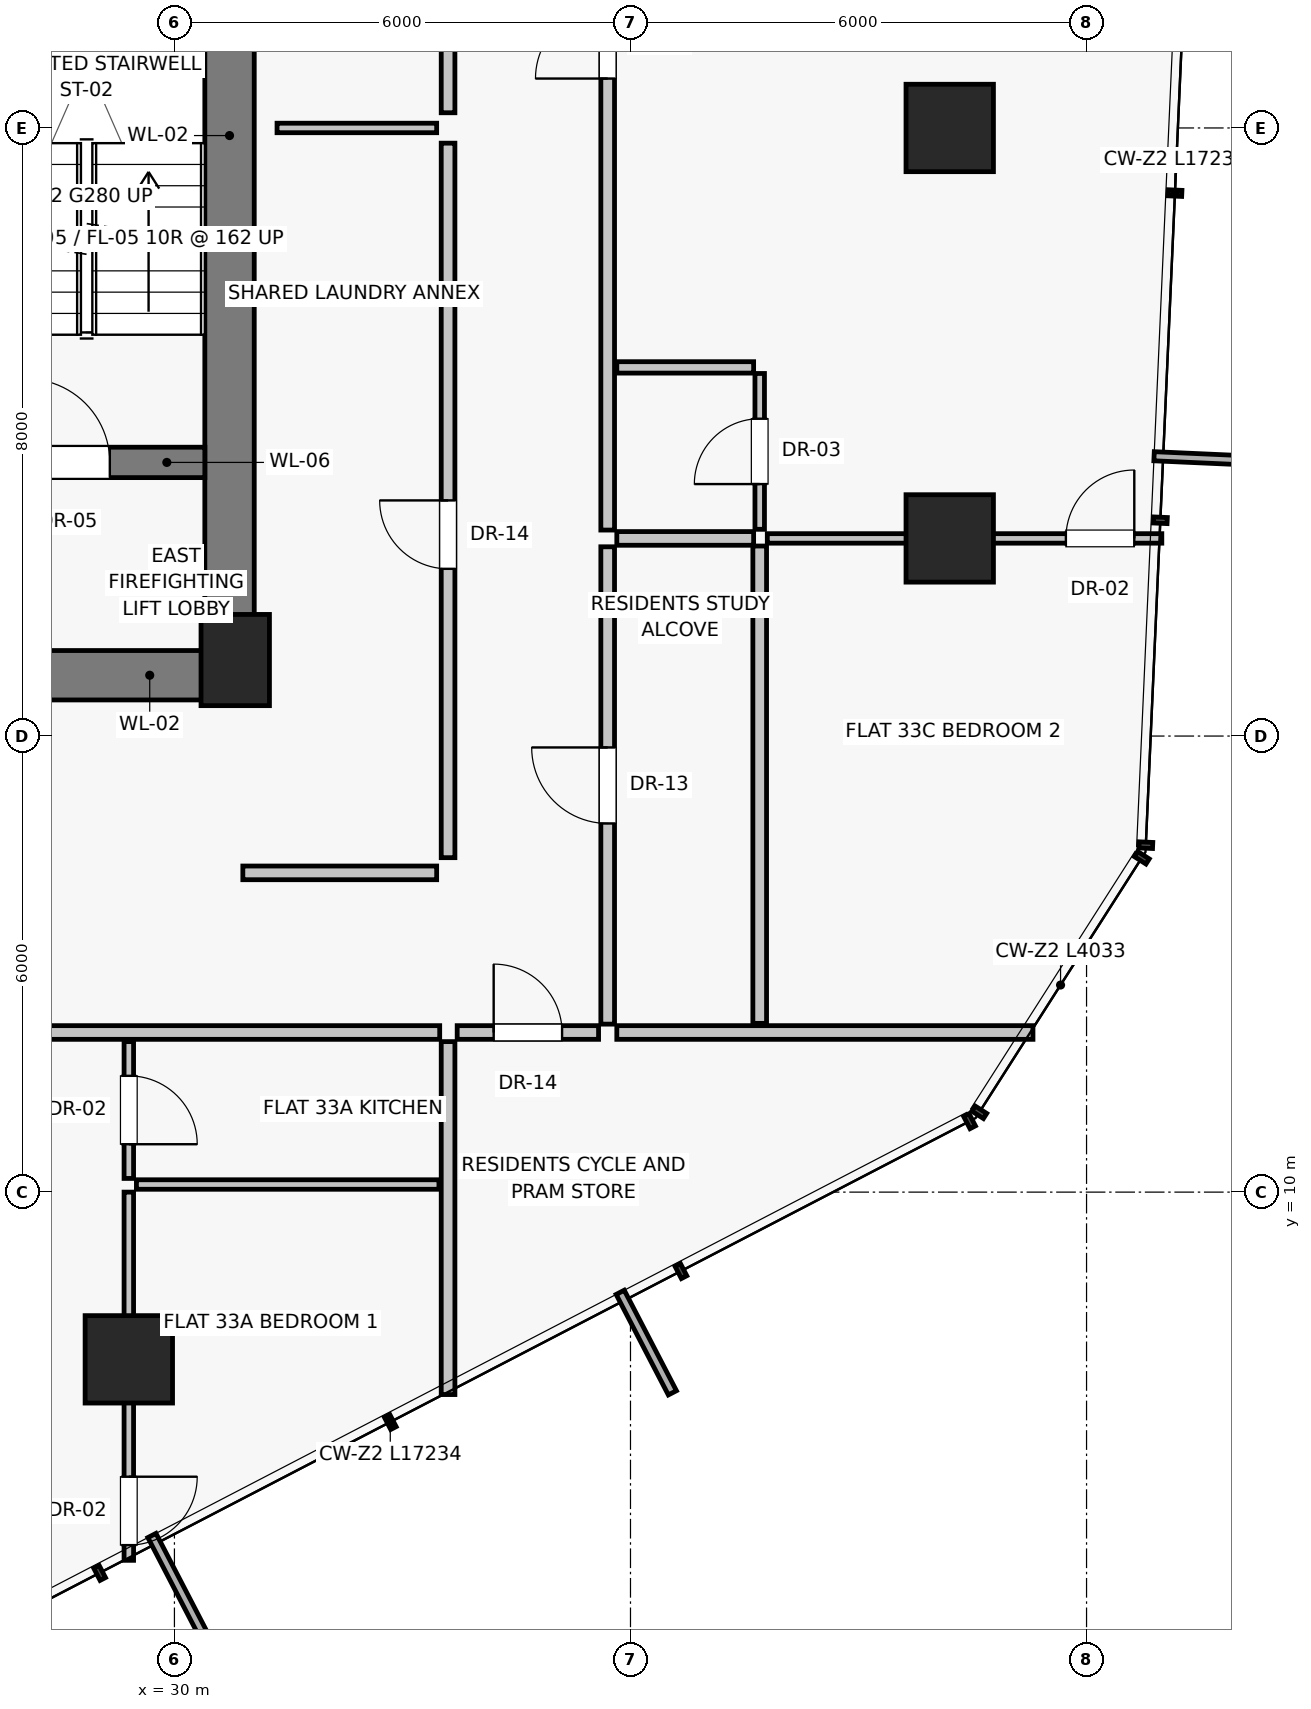
"""IFC4 building model, lengths in metres.
Left out: names, types, materials, properties, quantities, classifications, styles, units other than length and angle.
Written with IfcOpenShell. Run it as: python <this file> out.ifc"""

import sys

from ifc_helpers import new_model, si_unit, direction, frame, frame_2d, origin, origin_2d, place, context, subcontext, project, spatial, rectangle, extrude, source, transform, mapped, element, fill, save


model = new_model("IFC4")
c1 = context("Model", 3, precision=1e-05, world=origin(), true_north=direction((0.0, 1.0)))
c2 = subcontext(c1, "Body", "Model", "MODEL_VIEW")
j1 = project(units=[si_unit("LENGTHUNIT", "METRE"), si_unit("PLANEANGLEUNIT", "RADIAN")], contexts=[c1])
p1 = place(None, origin())
s1 = spatial("IfcSite", under=j1, at=p1, CompositionType="ELEMENT")
p2 = place(p1, origin())
s2 = spatial("IfcBuilding", under=s1, at=p2, CompositionType="ELEMENT")
p3 = place(p2, frame((0.0, 0.0, 119.75)))
s3 = spatial("IfcBuildingStorey", under=s2, at=p3, CompositionType="ELEMENT", Elevation=119.75)
p4 = place(p3, frame((30.8, 17.0, 0.0), z_axis=(0.0, 0.0, 1.0), x_axis=(1.0, 0.0, 0.0)))
e1 = element("IfcColumn", 1, at=p4, inside=s3, PredefinedType="PILASTER", context=c2, shape_type="SweptSolid", body=[
    extrude(rectangle(XDim=0.9, YDim=1.2, at=origin_2d()), origin(), (0.0, 0.0, 1.0), 3.25),
])
for number, where, z_axis, x_axis in (
    (2, (40.2, 18.6, 0.0), (0.0, 0.0, 1.0), (1.0, 0.0, 0.0)),
    (3, (40.2, 24.0, 0.0), (0.0, 0.0, 1.0), (1.0, 0.0, 0.0)),
    (4, (29.4, 7.8, 0.0), (0.0, 0.0, 1.0), (1.0, 0.0, 0.0)),
):
    element("IfcColumn", number, at=place(p3, frame(where, z_axis=z_axis, x_axis=x_axis)), inside=s3, PredefinedType="COLUMN", context=c2, shape_type="SweptSolid", body=[
        extrude(rectangle(XDim=1.15, YDim=1.15, at=origin_2d()), origin(), (0.0, 0.0, 1.0), 3.25),
    ])
p5 = place(p3, frame((30.725, 16.8, 0.0), z_axis=(0.0, 0.0, 1.0), x_axis=(0.0, 1.0, 0.0)))
e5 = element("IfcWall", 5, at=p5, inside=s3, PredefinedType="SHEAR", context=c2, shape_type="SweptSolid", body=[
    extrude(rectangle(XDim=14.2, YDim=0.65, at=frame_2d((7.1, 0.0))), origin(), (0.0, 0.0, 1.0), 3.0),
])
p6 = place(p3, frame((24.95, 16.8, 0.0), z_axis=(0.0, 0.0, 1.0), x_axis=(1.0, 0.0, 0.0)))
e6 = element("IfcWall", 6, at=p6, inside=s3, PredefinedType="SHEAR", context=c2, shape_type="SweptSolid", body=[
    extrude(rectangle(XDim=5.85, YDim=0.65, at=frame_2d((2.925, 0.0))), origin(), (0.0, 0.0, 1.0), 3.0),
])
p7 = place(p6, frame((2.15, 0.0, 0.0)))
e7 = element("IfcOpeningElement", 7, at=p7, cuts=e6, PredefinedType="OPENING", context=c2, shape_type="SweptSolid", body=[
    extrude(rectangle(XDim=1.2, YDim=2.03, at=frame_2d((0.6, 1.015))), frame((0.0, 0.335, 0.0), z_axis=(0.0, -1.0, 0.0), x_axis=(1.0, 0.0, 0.0)), (0.0, 0.0, 1.0), 0.67),
])
p8 = place(p3, frame((27.0, 19.6, 0.0), z_axis=(0.0, 0.0, 1.0), x_axis=(1.0, 0.0, 0.0)))
e8 = element("IfcWall", 8, at=p8, inside=s3, PredefinedType="SHEAR", context=c2, shape_type="SweptSolid", body=[
    extrude(rectangle(XDim=3.4, YDim=0.4, at=frame_2d((1.7, 0.0))), origin(), (0.0, 0.0, 1.0), 3.0),
])
p9 = place(p8, frame((1.05, 0.0, 0.0)))
e9 = element("IfcOpeningElement", 9, at=p9, cuts=e8, PredefinedType="OPENING", context=c2, shape_type="SweptSolid", body=[
    extrude(rectangle(XDim=1.1, YDim=2.03, at=frame_2d((0.55, 1.015))), frame((0.0, 0.21, 0.0), z_axis=(0.0, -1.0, 0.0), x_axis=(1.0, 0.0, 0.0)), (0.0, 0.0, 1.0), 0.42),
])
p10 = place(p3, frame((33.6, 14.4, 0.0), z_axis=(0.0, 0.0, 1.0), x_axis=(0.0, 1.0, 0.0)))
e10 = element("IfcWall", 10, at=p10, inside=s3, PredefinedType="PARTITIONING", context=c2, shape_type="SweptSolid", body=[
    extrude(rectangle(XDim=9.4, YDim=0.18, at=frame_2d((4.7, 0.0))), origin(), (0.0, 0.0, 1.0), 3.0),
])
p11 = place(p10, frame((3.8, 0.0, 0.0)))
e11 = element("IfcOpeningElement", 11, at=p11, cuts=e10, PredefinedType="OPENING", context=c2, shape_type="SweptSolid", body=[
    extrude(rectangle(XDim=0.9, YDim=2.01, at=frame_2d((0.45, 1.005))), frame((0.0, 0.1, 0.0), z_axis=(0.0, -1.0, 0.0), x_axis=(1.0, 0.0, 0.0)), (0.0, 0.0, 1.0), 0.2),
])
p12 = place(p3, frame((33.6, 24.2, 0.0), z_axis=(0.0, 0.0, 1.0), x_axis=(0.0, 1.0, 0.0)))
e12 = element("IfcWall", 12, at=p12, inside=s3, PredefinedType="PARTITIONING", context=c2, shape_type="SweptSolid", body=[
    extrude(rectangle(XDim=9.2, YDim=0.18, at=frame_2d((4.6, 0.0))), origin(), (0.0, 0.0, 1.0), 3.0),
])
p13 = place(p12, frame((3.8, 0.0, 0.0)))
e13 = element("IfcOpeningElement", 13, at=p13, cuts=e12, PredefinedType="OPENING", context=c2, shape_type="SweptSolid", body=[
    extrude(rectangle(XDim=0.9, YDim=2.01, at=frame_2d((0.45, 1.005))), frame((0.0, 0.1, 0.0), z_axis=(0.0, -1.0, 0.0), x_axis=(1.0, 0.0, 0.0)), (0.0, 0.0, 1.0), 0.2),
])
p14 = place(p3, frame((31.35, 24.0, 0.0), z_axis=(0.0, 0.0, 1.0), x_axis=(1.0, 0.0, 0.0)))
e14 = element("IfcWall", 14, at=p14, inside=s3, PredefinedType="PARTITIONING", context=c2, shape_type="SweptSolid", body=[
    extrude(rectangle(XDim=2.1, YDim=0.125, at=frame_2d((1.05, 0.0))), origin(), (0.0, 0.0, 1.0), 3.0),
])
p15 = place(p3, frame((30.9, 14.2, 0.0), z_axis=(0.0, 0.0, 1.0), x_axis=(1.0, 0.0, 0.0)))
e15 = element("IfcWall", 15, at=p15, inside=s3, PredefinedType="PARTITIONING", context=c2, shape_type="SweptSolid", body=[
    extrude(rectangle(XDim=2.55, YDim=0.18, at=frame_2d((1.275, 0.0))), origin(), (0.0, 0.0, 1.0), 3.0),
])
p16 = place(p3, frame((33.6, 11.98, 0.0), z_axis=(0.0, 0.0, 1.0), x_axis=(0.0, -1.0, 0.0)))
e16 = element("IfcWall", 16, at=p16, inside=s3, PredefinedType="PARTITIONING", context=c2, shape_type="SweptSolid", body=[
    extrude(rectangle(XDim=4.643, YDim=0.18, at=frame_2d((2.322, 0.0))), origin(), (0.0, 0.0, 1.0), 3.0),
])
p17 = place(p3, frame((18.71, 12.1, 0.0), z_axis=(0.0, 0.0, 1.0), x_axis=(1.0, 0.0, 0.0)))
e17 = element("IfcWall", 17, at=p17, inside=s3, PredefinedType="PARTITIONING", context=c2, shape_type="SweptSolid", body=[
    extrude(rectangle(XDim=14.78, YDim=0.18, at=frame_2d((7.39, 0.0))), origin(), (0.0, 0.0, 1.0), 2.58),
])
p18 = place(p17, frame((5.94, 0.0, 0.0)))
e18 = element("IfcOpeningElement", 18, at=p18, cuts=e17, PredefinedType="OPENING", context=c2, shape_type="SweptSolid", body=[
    extrude(rectangle(XDim=0.95, YDim=2.02, at=frame_2d((0.475, 1.01))), frame((0.0, 0.1, 0.0), z_axis=(0.0, -1.0, 0.0), x_axis=(1.0, 0.0, 0.0)), (0.0, 0.0, 1.0), 0.2),
])
p19 = place(p3, frame((29.4, 11.98, 0.0), z_axis=(0.0, 0.0, 1.0), x_axis=(0.0, -1.0, 0.0)))
e19 = element("IfcWall", 19, at=p19, inside=s3, PredefinedType="PARTITIONING", context=c2, shape_type="SweptSolid", body=[
    extrude(rectangle(XDim=1.8, YDim=0.125, at=frame_2d((0.9, 0.0))), origin(), (0.0, 0.0, 1.0), 2.378),
])
p20 = place(p19, frame((0.45, 0.0, 0.0)))
e20 = element("IfcOpeningElement", 20, at=p20, cuts=e19, PredefinedType="OPENING", context=c2, shape_type="SweptSolid", body=[
    extrude(rectangle(XDim=0.9, YDim=2.01, at=frame_2d((0.45, 1.005))), frame((0.0, 0.073, 0.0), z_axis=(0.0, -1.0, 0.0), x_axis=(1.0, 0.0, 0.0)), (0.0, 0.0, 1.0), 0.145),
])
p21 = place(p3, frame((29.5, 10.1, 0.0), z_axis=(0.0, 0.0, 1.0), x_axis=(1.0, 0.0, 0.0)))
e21 = element("IfcWall", 21, at=p21, inside=s3, PredefinedType="PARTITIONING", context=c2, shape_type="SweptSolid", body=[
    extrude(rectangle(XDim=3.98, YDim=0.125, at=frame_2d((1.99, 0.0))), origin(), (0.0, 0.0, 1.0), 3.0),
])
p22 = place(p3, frame((29.4, 10.0, 0.0), z_axis=(0.0, 0.0, 1.0), x_axis=(0.0, -1.0, 0.0)))
e22 = element("IfcWall", 22, at=p22, inside=s3, PredefinedType="PARTITIONING", context=c2, shape_type="SweptSolid", body=[
    extrude(rectangle(XDim=4.844, YDim=0.125, at=frame_2d((2.422, 0.0))), origin(), (0.0, 0.0, 1.0), 2.378),
])
p23 = place(p22, frame((3.744, 0.0, 0.0)))
e23 = element("IfcOpeningElement", 23, at=p23, cuts=e22, PredefinedType="OPENING", context=c2, shape_type="SweptSolid", body=[
    extrude(rectangle(XDim=0.9, YDim=2.01, at=frame_2d((0.45, 1.005))), frame((0.0, 0.073, 0.0), z_axis=(0.0, -1.0, 0.0), x_axis=(1.0, 0.0, 0.0)), (0.0, 0.0, 1.0), 0.145),
])
p24 = place(p3, frame((35.82, 12.1, 0.0), z_axis=(0.0, 0.0, 1.0), x_axis=(1.0, 0.0, 0.0)))
e24 = element("IfcWall", 24, at=p24, inside=s3, PredefinedType="PARTITIONING", context=c2, shape_type="SweptSolid", body=[
    extrude(rectangle(XDim=5.475, YDim=0.18, at=frame_2d((2.737, 0.0))), origin(), (0.0, 0.0, 1.0), 3.0),
])
p25 = place(p3, frame((35.7, 12.21, 0.0), z_axis=(0.0, 0.0, 1.0), x_axis=(0.0, 1.0, 0.0)))
e25 = element("IfcWall", 25, at=p25, inside=s3, PredefinedType="PARTITIONING", context=c2, shape_type="SweptSolid", body=[
    extrude(rectangle(XDim=6.28, YDim=0.18, at=frame_2d((3.14, 0.0))), origin(), (0.0, 0.0, 1.0), 2.58),
])
p26 = place(p25, frame((2.64, 0.0, 0.0)))
e26 = element("IfcOpeningElement", 26, at=p26, cuts=e25, PredefinedType="OPENING", context=c2, shape_type="SweptSolid", body=[
    extrude(rectangle(XDim=1.0, YDim=2.01, at=frame_2d((0.5, 1.005))), frame((0.0, 0.1, 0.0), z_axis=(0.0, -1.0, 0.0), x_axis=(1.0, 0.0, 0.0)), (0.0, 0.0, 1.0), 0.2),
])
p27 = place(p3, frame((35.7, 18.71, 0.0), z_axis=(0.0, 0.0, 1.0), x_axis=(0.0, 1.0, 0.0)))
e27 = element("IfcWall", 27, at=p27, inside=s3, PredefinedType="PARTITIONING", context=c2, shape_type="SweptSolid", body=[
    extrude(rectangle(XDim=16.88, YDim=0.18, at=frame_2d((8.44, 0.0))), origin(), (0.0, 0.0, 1.0), 2.58),
])
p28 = place(p27, frame((5.94, 0.0, 0.0)))
e28 = element("IfcOpeningElement", 28, at=p28, cuts=e27, PredefinedType="OPENING", context=c2, shape_type="SweptSolid", body=[
    extrude(rectangle(XDim=0.95, YDim=2.02, at=frame_2d((0.475, 1.01))), frame((0.0, 0.1, 0.0), z_axis=(0.0, -1.0, 0.0), x_axis=(1.0, 0.0, 0.0)), (0.0, 0.0, 1.0), 0.2),
])
p29 = place(p3, frame((37.7, 12.22, 0.0), z_axis=(0.0, 0.0, 1.0), x_axis=(0.0, 1.0, 0.0)))
e29 = element("IfcWall", 29, at=p29, inside=s3, PredefinedType="PARTITIONING", context=c2, shape_type="SweptSolid", body=[
    extrude(rectangle(XDim=6.28, YDim=0.18, at=frame_2d((3.14, 0.0))), origin(), (0.0, 0.0, 1.0), 3.0),
])
p30 = place(p3, frame((35.82, 18.6, 0.0), z_axis=(0.0, 0.0, 1.0), x_axis=(1.0, 0.0, 0.0)))
e30 = element("IfcWall", 30, at=p30, inside=s3, PredefinedType="PARTITIONING", context=c2, shape_type="SweptSolid", body=[
    extrude(rectangle(XDim=1.8, YDim=0.18, at=frame_2d((0.9, 0.0))), origin(), (0.0, 0.0, 1.0), 2.378),
])
p31 = place(p3, frame((37.8, 18.6, 0.0), z_axis=(0.0, 0.0, 1.0), x_axis=(1.0, 0.0, 0.0)))
e31 = element("IfcWall", 31, at=p31, inside=s3, PredefinedType="PARTITIONING", context=c2, shape_type="SweptSolid", body=[
    extrude(rectangle(XDim=5.19, YDim=0.125, at=frame_2d((2.595, 0.0))), origin(), (0.0, 0.0, 1.0), 2.378),
])
p32 = place(p31, frame((3.928, 0.0, 0.0)))
e32 = element("IfcOpeningElement", 32, at=p32, cuts=e31, PredefinedType="OPENING", context=c2, shape_type="SweptSolid", body=[
    extrude(rectangle(XDim=0.9, YDim=2.01, at=frame_2d((0.45, 1.005))), frame((0.0, 0.073, 0.0), z_axis=(0.0, -1.0, 0.0), x_axis=(1.0, 0.0, 0.0)), (0.0, 0.0, 1.0), 0.145),
])
p33 = place(p3, frame((35.82, 20.85, 0.0), z_axis=(0.0, 0.0, 1.0), x_axis=(1.0, 0.0, 0.0)))
e33 = element("IfcWall", 33, at=p33, inside=s3, PredefinedType="PARTITIONING", context=c2, shape_type="SweptSolid", body=[
    extrude(rectangle(XDim=1.8, YDim=0.15, at=frame_2d((0.9, 0.0))), origin(), (0.0, 0.0, 1.0), 3.0),
])
p34 = place(p3, frame((37.7, 18.72, 0.0), z_axis=(0.0, 0.0, 1.0), x_axis=(0.0, 1.0, 0.0)))
e34 = element("IfcWall", 34, at=p34, inside=s3, PredefinedType="PARTITIONING", context=c2, shape_type="SweptSolid", body=[
    extrude(rectangle(XDim=2.05, YDim=0.125, at=frame_2d((1.025, 0.0))), origin(), (0.0, 0.0, 1.0), 3.0),
])
p35 = place(p34, frame((0.595, 0.0, 0.0)))
e35 = element("IfcOpeningElement", 35, at=p35, cuts=e34, PredefinedType="OPENING", context=c2, shape_type="SweptSolid", body=[
    extrude(rectangle(XDim=0.86, YDim=2.01, at=frame_2d((0.43, 1.005))), frame((0.0, 0.073, 0.0), z_axis=(0.0, -1.0, 0.0), x_axis=(1.0, 0.0, 0.0)), (0.0, 0.0, 1.0), 0.145),
])
p36 = place(p3, frame((33.72, 12.1, 0.0), z_axis=(0.0, 0.0, 1.0), x_axis=(1.0, 0.0, 0.0)))
e36 = element("IfcWall", 36, at=p36, inside=s3, PredefinedType="PARTITIONING", context=c2, shape_type="SweptSolid", body=[
    extrude(rectangle(XDim=1.86, YDim=0.18, at=frame_2d((0.93, 0.0))), origin(), (0.0, 0.0, 1.0), 3.0),
])
p37 = place(p36, frame((0.48, 0.0, 0.0)))
e37 = element("IfcOpeningElement", 37, at=p37, cuts=e36, PredefinedType="OPENING", context=c2, shape_type="SweptSolid", body=[
    extrude(rectangle(XDim=0.9, YDim=2.01, at=frame_2d((0.45, 1.005))), frame((0.0, 0.1, 0.0), z_axis=(0.0, -1.0, 0.0), x_axis=(1.0, 0.0, 0.0)), (0.0, 0.0, 1.0), 0.2),
])
m1 = source(origin(), c2, "Body", "SweptSolid", [
    extrude(rectangle(XDim=1.1, YDim=2.03, at=frame_2d((0.55, 1.015))), frame((0.0, 0.025, 0.0), z_axis=(0.0, -1.0, 0.0), x_axis=(1.0, 0.0, 0.0)), (0.0, 0.0, 1.0), 0.05),
])
p38 = place(p9, origin())
e38 = element("IfcDoor", 38, at=p38, inside=s3, OperationType="SINGLE_SWING_LEFT", PredefinedType="DOOR", context=c2, shape_type="MappedRepresentation", body=[
    mapped(m1, transform((0.0, 0.0, 0.0), scale=1.0)),
])
fill(e9, e38)
m2 = source(origin(), c2, "Body", "SweptSolid", [
    extrude(rectangle(XDim=0.9, YDim=2.01, at=frame_2d((0.45, 1.005))), frame((0.0, 0.025, 0.0), z_axis=(0.0, -1.0, 0.0), x_axis=(1.0, 0.0, 0.0)), (0.0, 0.0, 1.0), 0.05),
])
p39 = place(p11, origin())
e39 = element("IfcDoor", 39, at=p39, inside=s3, OperationType="SINGLE_SWING_RIGHT", PredefinedType="DOOR", context=c2, shape_type="MappedRepresentation", body=[
    mapped(m2, transform((0.0, 0.0, 0.0), scale=1.0)),
])
fill(e11, e39)
p40 = place(p20, origin())
e40 = element("IfcDoor", 40, at=p40, inside=s3, OperationType="SINGLE_SWING_RIGHT", PredefinedType="DOOR", context=c2, shape_type="MappedRepresentation", body=[
    mapped(m2, transform((0.0, 0.0, 0.0), scale=1.0)),
])
fill(e20, e40)
p41 = place(p23, origin())
e41 = element("IfcDoor", 41, at=p41, inside=s3, OperationType="SINGLE_SWING_LEFT", PredefinedType="DOOR", context=c2, shape_type="MappedRepresentation", body=[
    mapped(m2, transform((0.0, 0.0, 0.0), scale=1.0)),
])
fill(e23, e41)
m3 = source(origin(), c2, "Body", "SweptSolid", [
    extrude(rectangle(XDim=1.0, YDim=2.01, at=frame_2d((0.5, 1.005))), frame((0.0, 0.025, 0.0), z_axis=(0.0, -1.0, 0.0), x_axis=(1.0, 0.0, 0.0)), (0.0, 0.0, 1.0), 0.05),
])
p42 = place(p26, origin())
e42 = element("IfcDoor", 42, at=p42, inside=s3, OperationType="SINGLE_SWING_RIGHT", PredefinedType="DOOR", context=c2, shape_type="MappedRepresentation", body=[
    mapped(m3, transform((0.0, 0.0, 0.0), scale=1.0)),
])
fill(e26, e42)
m4 = source(origin(), c2, "Body", "SweptSolid", [
    extrude(rectangle(XDim=0.95, YDim=2.02, at=frame_2d((0.475, 1.01))), frame((0.0, 0.025, 0.0), z_axis=(0.0, -1.0, 0.0), x_axis=(1.0, 0.0, 0.0)), (0.0, 0.0, 1.0), 0.05),
])
p43 = place(p28, origin())
e43 = element("IfcDoor", 43, at=p43, inside=s3, OperationType="SINGLE_SWING_LEFT", PredefinedType="DOOR", context=c2, shape_type="MappedRepresentation", body=[
    mapped(m4, transform((0.0, 0.0, 0.0), scale=1.0)),
])
fill(e28, e43)
p44 = place(p32, origin())
e44 = element("IfcDoor", 44, at=p44, inside=s3, OperationType="SINGLE_SWING_RIGHT", PredefinedType="DOOR", context=c2, shape_type="MappedRepresentation", body=[
    mapped(m2, transform((0.0, 0.0, 0.0), scale=1.0)),
])
fill(e32, e44)
m5 = source(origin(), c2, "Body", "SweptSolid", [
    extrude(rectangle(XDim=0.86, YDim=2.01, at=frame_2d((0.43, 1.005))), frame((0.0, 0.025, 0.0), z_axis=(0.0, -1.0, 0.0), x_axis=(1.0, 0.0, 0.0)), (0.0, 0.0, 1.0), 0.05),
])
p45 = place(p35, origin())
e45 = element("IfcDoor", 45, at=p45, inside=s3, OperationType="SINGLE_SWING_LEFT", PredefinedType="DOOR", context=c2, shape_type="MappedRepresentation", body=[
    mapped(m5, transform((0.0, 0.0, 0.0), scale=1.0)),
])
fill(e35, e45)
p46 = place(p37, origin())
e46 = element("IfcDoor", 46, at=p46, inside=s3, OperationType="SINGLE_SWING_LEFT", PredefinedType="DOOR", context=c2, shape_type="MappedRepresentation", body=[
    mapped(m2, transform((0.0, 0.0, 0.0), scale=1.0)),
])
fill(e37, e46)
save(model, sys.argv[1])
